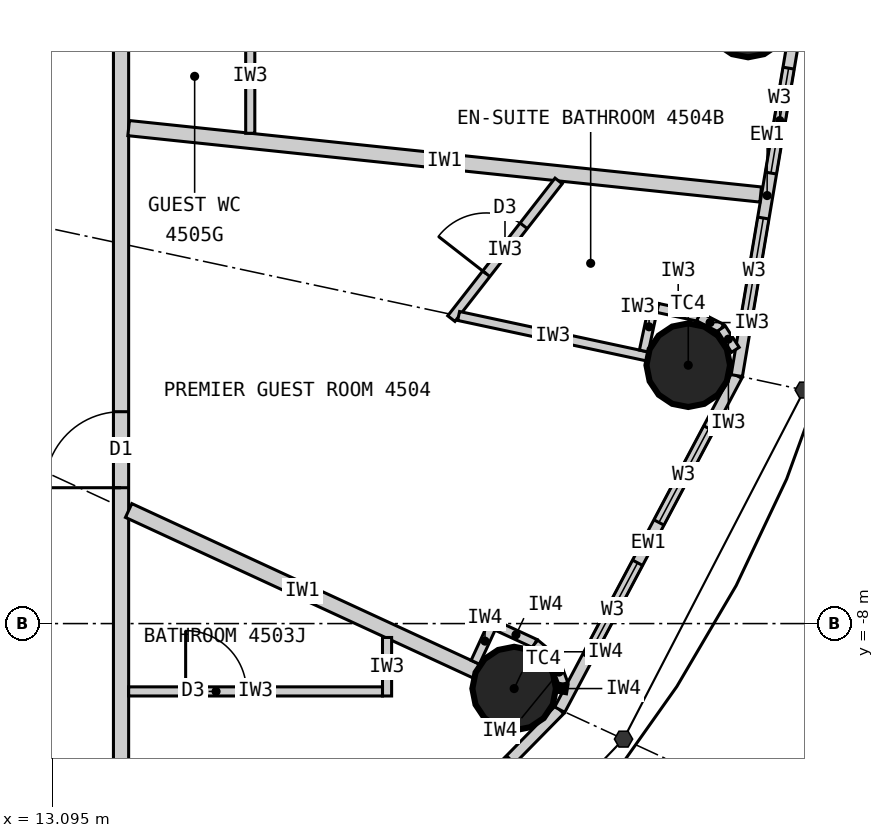
"""IFC4 building model, lengths in metres.
Left out: names, types, materials, properties, quantities, classifications, styles, units other than length and angle.
Written with IfcOpenShell. Run it as: python <this file> out.ifc"""

import sys

from ifc_helpers import new_model, si_unit, direction, frame, frame_2d, origin, origin_2d, place, context, subcontext, project, spatial, rectangle, circle, extrude, element, fill, save


model = new_model("IFC4")
c1 = context("Model", 3, precision=1e-05, world=origin(), true_north=direction((0.0, 1.0)))
c2 = subcontext(c1, "Body", "Model", "MODEL_VIEW")
j1 = project(units=[si_unit("LENGTHUNIT", "METRE"), si_unit("PLANEANGLEUNIT", "RADIAN")], contexts=[c1])
p1 = place(None, origin())
s1 = spatial("IfcSite", under=j1, at=p1, CompositionType="ELEMENT")
p2 = place(p1, origin())
s2 = spatial("IfcBuilding", under=s1, at=p2, CompositionType="ELEMENT")
p3 = place(p2, frame((0.0, 0.0, 169.8)))
s3 = spatial("IfcBuildingStorey", under=s2, at=p3, CompositionType="ELEMENT", Elevation=169.8)
for number, where, z_axis, x_axis in (
    (1, (22.25, 0.0, 0.0), (0.0, 0.0, 1.0), (1.0, 0.0, 0.0)),
    (2, (19.172, -8.855, 0.0), (0.0, 0.0, 1.0), (1.0, 0.0, 0.0)),
    (3, (21.463, -4.601, 0.0), (0.0, 0.0, 1.0), (1.0, 0.0, 0.0)),
):
    element("IfcColumn", number, at=place(p3, frame(where, z_axis=z_axis, x_axis=x_axis)), inside=s3, PredefinedType="COLUMN", context=c2, shape_type="SweptSolid", body=[
        extrude(circle(Radius=0.55, at=origin_2d()), origin(), (0.0, 0.0, 1.0), 3.3),
    ])
p4 = place(p3, frame((16.095, -12.876, 0.0), z_axis=(0.0, 0.0, 1.0), x_axis=(0.700727467776, 0.71342905457, 0.0)))
e4 = element("IfcWall", 4, at=p4, inside=s3, PredefinedType="ELEMENTEDWALL", context=c2, shape_type="SweptSolid", body=[
    extrude(rectangle(XDim=5.247, YDim=0.15, at=frame_2d((2.624, 0.0))), origin(), (0.0, 0.0, 1.0), 3.12),
])
p5 = place(p4, frame((0.924, 0.0, 0.9)))
e5 = element("IfcOpeningElement", 5, at=p5, cuts=e4, PredefinedType="OPENING", context=c2, shape_type="SweptSolid", body=[
    extrude(rectangle(XDim=1.4, YDim=1.9, at=frame_2d((0.7, 0.95))), frame((0.0, 0.085, 0.0), z_axis=(0.0, -1.0, 0.0), x_axis=(1.0, 0.0, 0.0)), (0.0, 0.0, 1.0), 0.17),
])
p6 = place(p4, frame((2.924, 0.0, 0.9)))
e6 = element("IfcOpeningElement", 6, at=p6, cuts=e4, PredefinedType="OPENING", context=c2, shape_type="SweptSolid", body=[
    extrude(rectangle(XDim=1.4, YDim=1.9, at=frame_2d((0.7, 0.95))), frame((0.0, 0.085, 0.0), z_axis=(0.0, -1.0, 0.0), x_axis=(1.0, 0.0, 0.0)), (0.0, 0.0, 1.0), 0.17),
])
p7 = place(p3, frame((19.772, -9.132, 0.0), z_axis=(0.0, 0.0, 1.0), x_axis=(0.468428906714, 0.883501193748, 0.0)))
e7 = element("IfcWall", 7, at=p7, inside=s3, PredefinedType="ELEMENTEDWALL", context=c2, shape_type="SweptSolid", body=[
    extrude(rectangle(XDim=4.974, YDim=0.15, at=frame_2d((2.487, 0.0))), origin(), (0.0, 0.0, 1.0), 3.12),
])
p8 = place(p7, frame((0.787, 0.0, 0.9)))
e8 = element("IfcOpeningElement", 8, at=p8, cuts=e7, PredefinedType="OPENING", context=c2, shape_type="SweptSolid", body=[
    extrude(rectangle(XDim=1.4, YDim=1.9, at=frame_2d((0.7, 0.95))), frame((0.0, 0.085, 0.0), z_axis=(0.0, -1.0, 0.0), x_axis=(1.0, 0.0, 0.0)), (0.0, 0.0, 1.0), 0.17),
])
p9 = place(p7, frame((2.787, 0.0, 0.9)))
e9 = element("IfcOpeningElement", 9, at=p9, cuts=e7, PredefinedType="OPENING", context=c2, shape_type="SweptSolid", body=[
    extrude(rectangle(XDim=1.4, YDim=1.9, at=frame_2d((0.7, 0.95))), frame((0.0, 0.085, 0.0), z_axis=(0.0, -1.0, 0.0), x_axis=(1.0, 0.0, 0.0)), (0.0, 0.0, 1.0), 0.17),
])
p10 = place(p3, frame((22.102, -4.738, 0.0), z_axis=(0.0, 0.0, 1.0), x_axis=(0.166162111254, 0.986098449843, 0.0)))
e10 = element("IfcWall", 10, at=p10, inside=s3, PredefinedType="ELEMENTEDWALL", context=c2, shape_type="SweptSolid", body=[
    extrude(rectangle(XDim=4.805, YDim=0.15, at=frame_2d((2.402, 0.0))), origin(), (0.0, 0.0, 1.0), 3.12),
])
p11 = place(p10, frame((0.702, 0.0, 0.9)))
e11 = element("IfcOpeningElement", 11, at=p11, cuts=e10, PredefinedType="OPENING", context=c2, shape_type="SweptSolid", body=[
    extrude(rectangle(XDim=1.4, YDim=1.9, at=frame_2d((0.7, 0.95))), frame((0.0, 0.085, 0.0), z_axis=(0.0, -1.0, 0.0), x_axis=(1.0, 0.0, 0.0)), (0.0, 0.0, 1.0), 0.17),
])
p12 = place(p10, frame((2.702, 0.0, 0.9)))
e12 = element("IfcOpeningElement", 12, at=p12, cuts=e10, PredefinedType="OPENING", context=c2, shape_type="SweptSolid", body=[
    extrude(rectangle(XDim=1.4, YDim=1.9, at=frame_2d((0.7, 0.95))), frame((0.0, 0.085, 0.0), z_axis=(0.0, -1.0, 0.0), x_axis=(1.0, 0.0, 0.0)), (0.0, 0.0, 1.0), 0.17),
])
p13 = place(p3, frame((14.0, -9.9, 0.0), z_axis=(0.0, 0.0, 1.0), x_axis=(0.0, 1.0, 0.0)))
e13 = element("IfcWall", 13, at=p13, inside=s3, PredefinedType="PARTITIONING", context=c2, shape_type="SweptSolid", body=[
    extrude(rectangle(XDim=19.8, YDim=0.2, at=frame_2d((9.9, 0.0))), origin(), (0.0, 0.0, 1.0), 3.12),
])
p14 = place(p13, frame((3.688, 0.0, 0.0)))
e14 = element("IfcOpeningElement", 14, at=p14, cuts=e13, PredefinedType="OPENING", context=c2, shape_type="SweptSolid", body=[
    extrude(rectangle(XDim=1.0, YDim=2.2, at=frame_2d((0.5, 1.1))), frame((0.0, 0.11, 0.0), z_axis=(0.0, -1.0, 0.0), x_axis=(1.0, 0.0, 0.0)), (0.0, 0.0, 1.0), 0.22),
])
p15 = place(p13, frame((9.979, 0.0, 0.0)))
e15 = element("IfcOpeningElement", 15, at=p15, cuts=e13, PredefinedType="OPENING", context=c2, shape_type="SweptSolid", body=[
    extrude(rectangle(XDim=1.0, YDim=2.2, at=frame_2d((0.5, 1.1))), frame((0.0, 0.11, 0.0), z_axis=(0.0, -1.0, 0.0), x_axis=(1.0, 0.0, 0.0)), (0.0, 0.0, 1.0), 0.22),
])
p16 = place(p13, frame((17.122, 0.0, 0.0)))
e16 = element("IfcOpeningElement", 16, at=p16, cuts=e13, PredefinedType="OPENING", context=c2, shape_type="SweptSolid", body=[
    extrude(rectangle(XDim=1.0, YDim=2.2, at=frame_2d((0.5, 1.1))), frame((0.0, 0.11, 0.0), z_axis=(0.0, -1.0, 0.0), x_axis=(1.0, 0.0, 0.0)), (0.0, 0.0, 1.0), 0.22),
])
p17 = place(p3, frame((14.1, -6.512, 0.0), z_axis=(0.0, 0.0, 1.0), x_axis=(0.907823150669, -0.419353224751, 0.0)))
e17 = element("IfcWall", 17, at=p17, inside=s3, PredefinedType="PARTITIONING", context=c2, shape_type="SweptSolid", body=[
    extrude(rectangle(XDim=5.037, YDim=0.2, at=frame_2d((2.519, 0.0))), origin(), (0.0, 0.0, 1.0), 2.32),
])
p18 = place(p3, frame((14.1, -1.481, 0.0), z_axis=(0.0, 0.0, 1.0), x_axis=(0.994524794819, -0.104500873159, 0.0)))
e18 = element("IfcWall", 18, at=p18, inside=s3, PredefinedType="PARTITIONING", context=c2, shape_type="SweptSolid", body=[
    extrude(rectangle(XDim=8.362, YDim=0.2, at=frame_2d((4.181, 0.0))), origin(), (0.0, 0.0, 1.0), 2.47),
])
p19 = place(p3, frame((17.5, -8.183, 0.0), z_axis=(0.0, 0.0, 1.0), x_axis=(0.0, -1.0, 0.0)))
e19 = element("IfcWall", 19, at=p19, inside=s3, PredefinedType="PARTITIONING", context=c2, shape_type="SweptSolid", body=[
    extrude(rectangle(XDim=0.77, YDim=0.12, at=frame_2d((0.385, 0.0))), origin(), (0.0, 0.0, 1.0), 3.12),
])
p20 = place(p3, frame((14.1, -8.893, 0.0), z_axis=(0.0, 0.0, 1.0), x_axis=(1.0, 0.0, 0.0)))
e20 = element("IfcWall", 20, at=p20, inside=s3, PredefinedType="PARTITIONING", context=c2, shape_type="SweptSolid", body=[
    extrude(rectangle(XDim=3.34, YDim=0.12, at=frame_2d((1.67, 0.0))), origin(), (0.0, 0.0, 1.0), 3.12),
])
p21 = place(p20, frame((0.75, 0.0, 0.0)))
e21 = element("IfcOpeningElement", 21, at=p21, cuts=e20, PredefinedType="OPENING", context=c2, shape_type="SweptSolid", body=[
    extrude(rectangle(XDim=0.8, YDim=2.1, at=frame_2d((0.4, 1.05))), frame((0.0, 0.07, 0.0), z_axis=(0.0, -1.0, 0.0), x_axis=(1.0, 0.0, 0.0)), (0.0, 0.0, 1.0), 0.14),
])
p22 = place(p3, frame((19.758, -2.177, 0.0), z_axis=(0.0, 0.0, 1.0), x_axis=(-0.614713147302, -0.788750750576, 0.0)))
e22 = element("IfcWall", 22, at=p22, inside=s3, PredefinedType="PARTITIONING", context=c2, shape_type="SweptSolid", body=[
    extrude(rectangle(XDim=2.296, YDim=0.12, at=frame_2d((1.148, 0.0))), origin(), (0.0, 0.0, 1.0), 3.12),
])
p23 = place(p22, frame((0.748, 0.0, 0.0)))
e23 = element("IfcOpeningElement", 23, at=p23, cuts=e22, PredefinedType="OPENING", context=c2, shape_type="SweptSolid", body=[
    extrude(rectangle(XDim=0.8, YDim=2.1, at=frame_2d((0.4, 1.05))), frame((0.0, 0.07, 0.0), z_axis=(0.0, -1.0, 0.0), x_axis=(1.0, 0.0, 0.0)), (0.0, 0.0, 1.0), 0.14),
])
p24 = place(p3, frame((18.441, -3.953, 0.0), z_axis=(0.0, 0.0, 1.0), x_axis=(0.977801007461, -0.209535652833, 0.0)))
e24 = element("IfcWall", 24, at=p24, inside=s3, PredefinedType="PARTITIONING", context=c2, shape_type="SweptSolid", body=[
    extrude(rectangle(XDim=2.54, YDim=0.12, at=frame_2d((1.27, 0.0))), origin(), (0.0, 0.0, 1.0), 2.42),
])
p25 = place(p3, frame((20.879, -4.414, 0.0), z_axis=(0.0, 0.0, 1.0), x_axis=(0.209554644104, 0.977796937577, 0.0)))
e25 = element("IfcWall", 25, at=p25, inside=s3, PredefinedType="PARTITIONING", context=c2, shape_type="SweptSolid", body=[
    extrude(rectangle(XDim=0.652, YDim=0.12, at=frame_2d((0.326, 0.0))), origin(), (0.0, 0.0, 1.0), 3.12),
])
p26 = place(p3, frame((21.062, -3.848, 0.0), z_axis=(0.0, 0.0, 1.0), x_axis=(0.977789415726, -0.209589738521, 0.0)))
e26 = element("IfcWall", 26, at=p26, inside=s3, PredefinedType="PARTITIONING", context=c2, shape_type="SweptSolid", body=[
    extrude(rectangle(XDim=0.55, YDim=0.12, at=frame_2d((0.275, 0.0))), origin(), (0.0, 0.0, 1.0), 3.12),
])
p27 = place(p3, frame((21.599, -3.963, 0.0), z_axis=(0.0, 0.0, 1.0), x_axis=(0.890193602875, -0.455582428766, 0.0)))
e27 = element("IfcWall", 27, at=p27, inside=s3, PredefinedType="PARTITIONING", context=c2, shape_type="SweptSolid", body=[
    extrude(rectangle(XDim=0.338, YDim=0.12, at=frame_2d((0.169, 0.0))), origin(), (0.0, 0.0, 1.0), 3.12),
])
p28 = place(p3, frame((21.9, -4.117, 0.0), z_axis=(0.0, 0.0, 1.0), x_axis=(0.543582688681, -0.839355622228, 0.0)))
e28 = element("IfcWall", 28, at=p28, inside=s3, PredefinedType="PARTITIONING", context=c2, shape_type="SweptSolid", body=[
    extrude(rectangle(XDim=0.336, YDim=0.12, at=frame_2d((0.168, 0.0))), origin(), (0.0, 0.0, 1.0), 3.12),
])
p29 = place(p3, frame((15.7, -1.55, 0.0), z_axis=(0.0, 0.0, 1.0), x_axis=(0.0, 1.0, 0.0)))
e29 = element("IfcWall", 29, at=p29, inside=s3, PredefinedType="PARTITIONING", context=c2, shape_type="SweptSolid", body=[
    extrude(rectangle(XDim=1.508, YDim=0.12, at=frame_2d((0.754, 0.0))), origin(), (0.0, 0.0, 1.0), 3.12),
])
p30 = place(p3, frame((18.66, -8.509, 0.0), z_axis=(0.0, 0.0, 1.0), x_axis=(0.419083463716, 0.907947713494, 0.0)))
e30 = element("IfcWall", 30, at=p30, inside=s3, PredefinedType="PARTITIONING", context=c2, shape_type="SweptSolid", body=[
    extrude(rectangle(XDim=0.612, YDim=0.12, at=frame_2d((0.306, 0.0))), origin(), (0.0, 0.0, 1.0), 3.12),
])
p31 = place(p3, frame((18.946, -8.032, 0.0), z_axis=(0.0, 0.0, 1.0), x_axis=(0.907842467956, -0.419311403822, 0.0)))
e31 = element("IfcWall", 31, at=p31, inside=s3, PredefinedType="PARTITIONING", context=c2, shape_type="SweptSolid", body=[
    extrude(rectangle(XDim=0.55, YDim=0.12, at=frame_2d((0.275, 0.0))), origin(), (0.0, 0.0, 1.0), 3.12),
])
p32 = place(p3, frame((19.446, -8.263, 0.0), z_axis=(0.0, 0.0, 1.0), x_axis=(0.768221279597, -0.640184399664, 0.0)))
e32 = element("IfcWall", 32, at=p32, inside=s3, PredefinedType="PARTITIONING", context=c2, shape_type="SweptSolid", body=[
    extrude(rectangle(XDim=0.337, YDim=0.12, at=frame_2d((0.169, 0.0))), origin(), (0.0, 0.0, 1.0), 3.12),
])
p33 = place(p3, frame((19.705, -8.479, 0.0), z_axis=(0.0, 0.0, 1.0), x_axis=(0.345571344575, -0.938392479621, 0.0)))
e33 = element("IfcWall", 33, at=p33, inside=s3, PredefinedType="PARTITIONING", context=c2, shape_type="SweptSolid", body=[
    extrude(rectangle(XDim=0.338, YDim=0.12, at=frame_2d((0.169, 0.0))), origin(), (0.0, 0.0, 1.0), 3.12),
])
p34 = place(p3, frame((19.822, -8.796, 0.0), z_axis=(0.0, 0.0, 1.0), x_axis=(-0.169701508781, -0.985495508827, 0.0)))
e34 = element("IfcWall", 34, at=p34, inside=s3, PredefinedType="PARTITIONING", context=c2, shape_type="SweptSolid", body=[
    extrude(rectangle(XDim=0.119, YDim=0.12, at=frame_2d((0.06, 0.0))), origin(), (0.0, 0.0, 1.0), 3.12),
])
p35 = place(p8, origin())
e35 = element("IfcWindow", 35, at=p35, inside=s3, PartitioningType="SINGLE_PANEL", PredefinedType="WINDOW", context=c2, shape_type="SweptSolid", body=[
    extrude(rectangle(XDim=1.4, YDim=1.9, at=frame_2d((0.7, 0.95))), frame((0.0, 0.03, 0.0), z_axis=(0.0, -1.0, 0.0), x_axis=(1.0, 0.0, 0.0)), (0.0, 0.0, 1.0), 0.06),
])
fill(e8, e35)
p36 = place(p9, origin())
e36 = element("IfcWindow", 36, at=p36, inside=s3, PartitioningType="SINGLE_PANEL", PredefinedType="WINDOW", context=c2, shape_type="SweptSolid", body=[
    extrude(rectangle(XDim=1.4, YDim=1.9, at=frame_2d((0.7, 0.95))), frame((0.0, 0.03, 0.0), z_axis=(0.0, -1.0, 0.0), x_axis=(1.0, 0.0, 0.0)), (0.0, 0.0, 1.0), 0.06),
])
fill(e9, e36)
p37 = place(p11, origin())
e37 = element("IfcWindow", 37, at=p37, inside=s3, PartitioningType="SINGLE_PANEL", PredefinedType="WINDOW", context=c2, shape_type="SweptSolid", body=[
    extrude(rectangle(XDim=1.4, YDim=1.9, at=frame_2d((0.7, 0.95))), frame((0.0, 0.03, 0.0), z_axis=(0.0, -1.0, 0.0), x_axis=(1.0, 0.0, 0.0)), (0.0, 0.0, 1.0), 0.06),
])
fill(e11, e37)
p38 = place(p12, origin())
e38 = element("IfcWindow", 38, at=p38, inside=s3, PartitioningType="SINGLE_PANEL", PredefinedType="WINDOW", context=c2, shape_type="SweptSolid", body=[
    extrude(rectangle(XDim=1.4, YDim=1.9, at=frame_2d((0.7, 0.95))), frame((0.0, 0.03, 0.0), z_axis=(0.0, -1.0, 0.0), x_axis=(1.0, 0.0, 0.0)), (0.0, 0.0, 1.0), 0.06),
])
fill(e12, e38)
p39 = place(p21, origin())
e39 = element("IfcDoor", 39, at=p39, inside=s3, OperationType="SINGLE_SWING_LEFT", PredefinedType="DOOR", context=c2, shape_type="SweptSolid", body=[
    extrude(rectangle(XDim=0.8, YDim=2.1, at=frame_2d((0.4, 1.05))), frame((0.0, 0.025, 0.0), z_axis=(0.0, -1.0, 0.0), x_axis=(1.0, 0.0, 0.0)), (0.0, 0.0, 1.0), 0.05),
])
fill(e21, e39)
p40 = place(p23, origin())
e40 = element("IfcDoor", 40, at=p40, inside=s3, OperationType="SINGLE_SWING_RIGHT", PredefinedType="DOOR", context=c2, shape_type="SweptSolid", body=[
    extrude(rectangle(XDim=0.8, YDim=2.1, at=frame_2d((0.4, 1.05))), frame((0.0, 0.025, 0.0), z_axis=(0.0, -1.0, 0.0), x_axis=(1.0, 0.0, 0.0)), (0.0, 0.0, 1.0), 0.05),
])
fill(e23, e40)
p41 = place(p14, origin())
e41 = element("IfcDoor", 41, at=p41, inside=s3, OperationType="SINGLE_SWING_LEFT", PredefinedType="DOOR", context=c2, shape_type="SweptSolid", body=[
    extrude(rectangle(XDim=1.0, YDim=2.2, at=frame_2d((0.5, 1.1))), frame((0.0, 0.025, 0.0), z_axis=(0.0, -1.0, 0.0), x_axis=(1.0, 0.0, 0.0)), (0.0, 0.0, 1.0), 0.05),
])
fill(e14, e41)
save(model, sys.argv[1])
